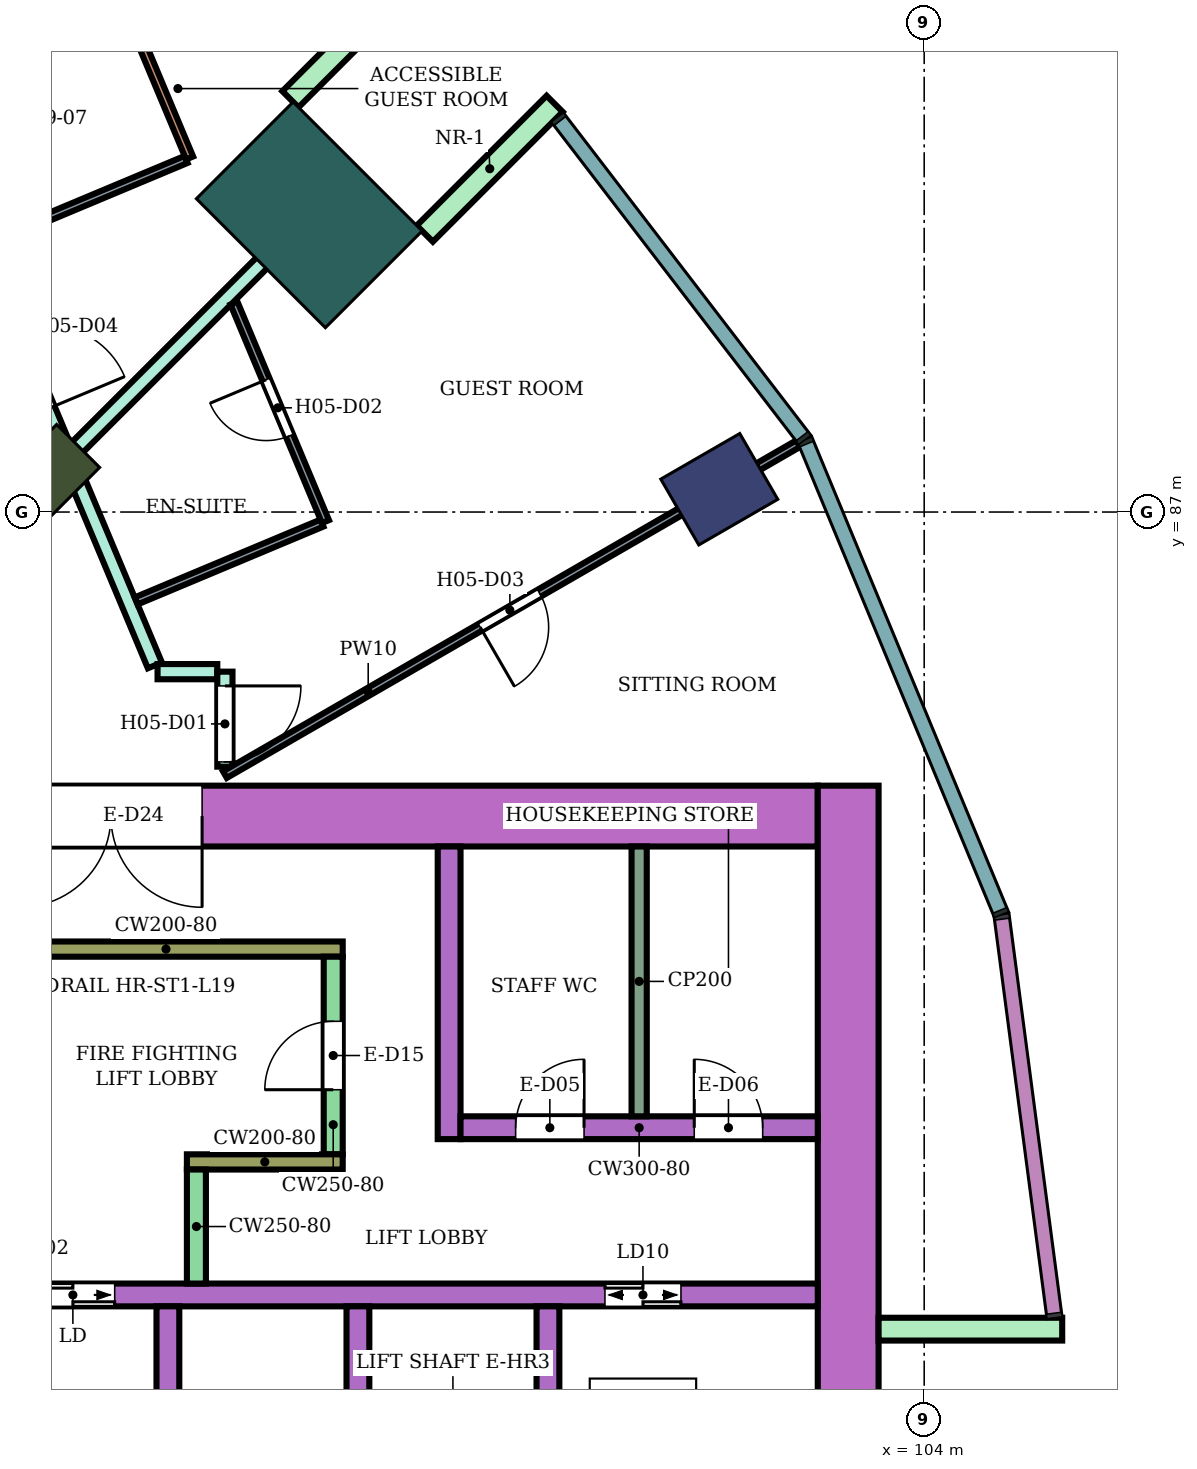
"""IFC4 building model, lengths in metres.
Left out: names, types, materials, properties, quantities, classifications, styles, units other than length and angle.
Written with IfcOpenShell. Run it as: python <this file> out.ifc"""

import sys

from ifc_helpers import new_model, si_unit, direction, frame, frame_2d, origin, origin_2d, place, context, subcontext, project, spatial, rectangle, extrude, element, fill, save


model = new_model("IFC4")
c1 = context("Model", 3, precision=1e-05, world=origin(), true_north=direction((0.0, 1.0)))
c2 = subcontext(c1, "Body", "Model", "MODEL_VIEW")
j1 = project(units=[si_unit("LENGTHUNIT", "METRE"), si_unit("PLANEANGLEUNIT", "RADIAN")], contexts=[c1])
p1 = place(None, origin())
s1 = spatial("IfcSite", under=j1, at=p1, CompositionType="ELEMENT")
p2 = place(p1, origin())
s2 = spatial("IfcBuilding", under=s1, at=p2, CompositionType="ELEMENT")
p3 = place(p2, frame((0.0, 0.0, 86.2)))
s3 = spatial("IfcBuildingStorey", under=s2, at=p3, CompositionType="ELEMENT", Elevation=86.2)
p4 = place(p3, frame((101.304, 87.3, 0.0), z_axis=(0.0, 0.0, 1.0), x_axis=(0.866025403784, 0.5, 0.0)))
e1 = element("IfcColumn", 1, at=p4, inside=s3, PredefinedType="COLUMN", context=c2, shape_type="SweptSolid", body=[
    extrude(rectangle(XDim=1.2, YDim=1.0, at=origin_2d()), origin(), (0.0, 0.0, 1.0), 3.8),
])
p5 = place(p3, frame((92.445, 87.445, 0.0), z_axis=(0.0, 0.0, 1.0), x_axis=(0.707106781187, 0.707106781187, 0.0)))
e2 = element("IfcColumn", 2, at=p5, inside=s3, PredefinedType="COLUMN", context=c2, shape_type="SweptSolid", body=[
    extrude(rectangle(XDim=1.2, YDim=0.8, at=origin_2d()), origin(), (0.0, 0.0, 1.0), 3.8),
])
p6 = place(p3, frame((95.91, 90.91, 0.0), z_axis=(0.0, 0.0, 1.0), x_axis=(0.707106781187, 0.707106781187, 0.0)))
e3 = element("IfcColumn", 3, at=p6, inside=s3, PredefinedType="COLUMN", context=c2, shape_type="SweptSolid", body=[
    extrude(rectangle(XDim=1.8, YDim=2.4, at=origin_2d()), origin(), (0.0, 0.0, 1.0), 3.8),
])
p7 = place(p3, frame((87.9, 83.0, 0.0), z_axis=(0.0, 0.0, 1.0), x_axis=(1.0, 0.0, 0.0)))
e4 = element("IfcWall", 4, at=p7, inside=s3, PredefinedType="SHEAR", context=c2, shape_type="SweptSolid", body=[
    extrude(rectangle(XDim=14.7, YDim=0.8, at=frame_2d((7.35, 0.0))), origin(), (0.0, 0.0, 1.0), 3.48),
])
p8 = place(p7, frame((4.2, 0.0, 0.0)))
e5 = element("IfcOpeningElement", 5, at=p8, cuts=e4, PredefinedType="OPENING", context=c2, shape_type="SweptSolid", body=[
    extrude(rectangle(XDim=2.4, YDim=2.4, at=frame_2d((1.2, 1.2))), frame((0.0, 0.41, 0.0), z_axis=(0.0, -1.0, 0.0), x_axis=(1.0, 0.0, 0.0)), (0.0, 0.0, 1.0), 0.82),
])
p9 = place(p3, frame((103.0, 66.6, 0.0), z_axis=(0.0, 0.0, 1.0), x_axis=(0.0, 1.0, 0.0)))
e6 = element("IfcWall", 6, at=p9, inside=s3, PredefinedType="SHEAR", context=c2, shape_type="SweptSolid", body=[
    extrude(rectangle(XDim=16.8, YDim=0.8, at=frame_2d((8.4, 0.0))), origin(), (0.0, 0.0, 1.0), 3.48),
])
p10 = place(p3, frame((91.7, 76.7, 0.0), z_axis=(0.0, 0.0, 1.0), x_axis=(1.0, 0.0, 0.0)))
e7 = element("IfcWall", 7, at=p10, inside=s3, PredefinedType="SHEAR", context=c2, shape_type="SweptSolid", body=[
    extrude(rectangle(XDim=10.9, YDim=0.3, at=frame_2d((5.45, 0.0))), origin(), (0.0, 0.0, 1.0), 3.48),
])
p11 = place(p10, frame((0.55, 0.0, 0.0)))
e8 = element("IfcOpeningElement", 8, at=p11, cuts=e7, PredefinedType="OPENING", context=c2, shape_type="SweptSolid", body=[
    extrude(rectangle(XDim=1.1, YDim=2.1, at=frame_2d((0.55, 1.05))), frame((0.0, 0.16, 0.0), z_axis=(0.0, -1.0, 0.0), x_axis=(1.0, 0.0, 0.0)), (0.0, 0.0, 1.0), 0.32),
])
p12 = place(p10, frame((8.1, 0.0, 0.0)))
e9 = element("IfcOpeningElement", 9, at=p12, cuts=e7, PredefinedType="OPENING", context=c2, shape_type="SweptSolid", body=[
    extrude(rectangle(XDim=1.0, YDim=2.1, at=frame_2d((0.5, 1.05))), frame((0.0, 0.16, 0.0), z_axis=(0.0, -1.0, 0.0), x_axis=(1.0, 0.0, 0.0)), (0.0, 0.0, 1.0), 0.32),
])
for number, where, z_axis, x_axis in (
    (10, (94.05, 74.0, 0.0), (0.0, 0.0, 1.0), (0.0, 1.0, 0.0)),
    (11, (96.55, 74.0, 0.0), (0.0, 0.0, 1.0), (0.0, 1.0, 0.0)),
    (12, (99.05, 74.0, 0.0), (0.0, 0.0, 1.0), (0.0, 1.0, 0.0)),
):
    element("IfcWall", number, at=place(p3, frame(where, z_axis=z_axis, x_axis=x_axis)), inside=s3, PredefinedType="SHEAR", context=c2, shape_type="SweptSolid", body=[
        extrude(rectangle(XDim=2.55, YDim=0.3, at=frame_2d((1.275, 0.0))), origin(), (0.0, 0.0, 1.0), 3.48),
    ])
p13 = place(p3, frame((91.7, 81.25, 0.0), z_axis=(0.0, 0.0, 1.0), x_axis=(1.0, 0.0, 0.0)))
e13 = element("IfcWall", 13, at=p13, inside=s3, PredefinedType="SHEAR", context=c2, shape_type="SweptSolid", body=[
    extrude(rectangle(XDim=4.65, YDim=0.2, at=frame_2d((2.325, 0.0))), origin(), (0.0, 0.0, 1.0), 3.48),
])
p14 = place(p3, frame((96.225, 78.55, 0.0), z_axis=(0.0, 0.0, 1.0), x_axis=(0.0, 1.0, 0.0)))
e14 = element("IfcWall", 14, at=p14, inside=s3, PredefinedType="SHEAR", context=c2, shape_type="SweptSolid", body=[
    extrude(rectangle(XDim=2.6, YDim=0.25, at=frame_2d((1.3, 0.0))), origin(), (0.0, 0.0, 1.0), 3.48),
])
p15 = place(p14, frame((0.85, 0.0, 0.0)))
e15 = element("IfcOpeningElement", 15, at=p15, cuts=e14, PredefinedType="OPENING", context=c2, shape_type="SweptSolid", body=[
    extrude(rectangle(XDim=0.9, YDim=2.1, at=frame_2d((0.45, 1.05))), frame((0.0, 0.135, 0.0), z_axis=(0.0, -1.0, 0.0), x_axis=(1.0, 0.0, 0.0)), (0.0, 0.0, 1.0), 0.27),
])
p16 = place(p3, frame((94.3, 78.45, 0.0), z_axis=(0.0, 0.0, 1.0), x_axis=(1.0, 0.0, 0.0)))
e16 = element("IfcWall", 16, at=p16, inside=s3, PredefinedType="SHEAR", context=c2, shape_type="SweptSolid", body=[
    extrude(rectangle(XDim=2.05, YDim=0.2, at=frame_2d((1.025, 0.0))), origin(), (0.0, 0.0, 1.0), 3.48),
])
p17 = place(p3, frame((94.425, 76.85, 0.0), z_axis=(0.0, 0.0, 1.0), x_axis=(0.0, 1.0, 0.0)))
e17 = element("IfcWall", 17, at=p17, inside=s3, PredefinedType="SHEAR", context=c2, shape_type="SweptSolid", body=[
    extrude(rectangle(XDim=1.5, YDim=0.25, at=frame_2d((0.75, 0.0))), origin(), (0.0, 0.0, 1.0), 3.48),
])
p18 = place(p3, frame((97.75, 78.75, 0.0), z_axis=(0.0, 0.0, 1.0), x_axis=(0.0, 1.0, 0.0)))
e18 = element("IfcWall", 18, at=p18, inside=s3, PredefinedType="SHEAR", context=c2, shape_type="SweptSolid", body=[
    extrude(rectangle(XDim=3.85, YDim=0.3, at=frame_2d((1.925, 0.0))), origin(), (0.0, 0.0, 1.0), 3.48),
])
p19 = place(p3, frame((97.9, 78.9, 0.0), z_axis=(0.0, 0.0, 1.0), x_axis=(1.0, 0.0, 0.0)))
e19 = element("IfcWall", 19, at=p19, inside=s3, PredefinedType="SHEAR", context=c2, shape_type="SweptSolid", body=[
    extrude(rectangle(XDim=4.7, YDim=0.3, at=frame_2d((2.35, 0.0))), origin(), (0.0, 0.0, 1.0), 3.48),
])
p20 = place(p19, frame((0.725, 0.0, 0.0)))
e20 = element("IfcOpeningElement", 20, at=p20, cuts=e19, PredefinedType="OPENING", context=c2, shape_type="SweptSolid", body=[
    extrude(rectangle(XDim=0.9, YDim=2.1, at=frame_2d((0.45, 1.05))), frame((0.0, 0.16, 0.0), z_axis=(0.0, -1.0, 0.0), x_axis=(1.0, 0.0, 0.0)), (0.0, 0.0, 1.0), 0.32),
])
p21 = place(p19, frame((3.075, 0.0, 0.0)))
e21 = element("IfcOpeningElement", 21, at=p21, cuts=e19, PredefinedType="OPENING", context=c2, shape_type="SweptSolid", body=[
    extrude(rectangle(XDim=0.9, YDim=2.1, at=frame_2d((0.45, 1.05))), frame((0.0, 0.16, 0.0), z_axis=(0.0, -1.0, 0.0), x_axis=(1.0, 0.0, 0.0)), (0.0, 0.0, 1.0), 0.32),
])
for number, where, z_axis, x_axis in (
    (22, (103.4, 76.25, 0.0), (0.0, 0.0, 1.0), (1.0, 0.0, 0.0)),
    (23, (97.43, 90.662, 0.0), (0.0, 0.0, 1.0), (0.707, 0.707, 0.0)),
    (24, (95.662, 92.43, 0.0), (0.0, 0.0, 1.0), (0.707, 0.707, 0.0)),
):
    element("IfcWall", number, at=place(p3, frame(where, z_axis=z_axis, x_axis=x_axis)), inside=s3, PredefinedType="NOTDEFINED", context=c2, shape_type="SweptSolid", body=[
        extrude(rectangle(XDim=2.416, YDim=0.3, at=frame_2d((1.208, 0.0))), origin(), (0.0, 0.0, 1.0), 3.8),
    ])
p22 = place(p3, frame((90.327, 92.878, 0.0), z_axis=(0.0, 0.0, 1.0), x_axis=(0.50022153717, 0.865897461453, 0.0)))
e25 = element("IfcWall", 25, at=p22, inside=s3, PredefinedType="PARTITIONING", context=c2, shape_type="SweptSolid", body=[
    extrude(rectangle(XDim=5.152, YDim=0.2, at=frame_2d((2.576, 0.0))), origin(), (0.0, 0.0, 1.0), 3.35),
])
p23 = place(p3, frame((90.604, 92.805, 0.0), z_axis=(0.0, 0.0, 1.0), x_axis=(0.386209298583, -0.922411176042, 0.0)))
e26 = element("IfcWall", 26, at=p23, inside=s3, PredefinedType="PARTITIONING", context=c2, shape_type="SweptSolid", body=[
    extrude(rectangle(XDim=8.48, YDim=0.2, at=frame_2d((4.24, 0.0))), origin(), (0.0, 0.0, 1.0), 3.35),
])
p24 = place(p23, frame((3.723, 0.0, 0.0)))
e27 = element("IfcOpeningElement", 27, at=p24, cuts=e26, PredefinedType="OPENING", context=c2, shape_type="SweptSolid", body=[
    extrude(rectangle(XDim=1.1, YDim=2.1, at=frame_2d((0.55, 1.05))), frame((0.0, 0.11, 0.0), z_axis=(0.0, -1.0, 0.0), x_axis=(1.0, 0.0, 0.0)), (0.0, 0.0, 1.0), 0.22),
])
p25 = place(p3, frame((92.832, 87.824, 0.0), z_axis=(0.0, 0.0, 1.0), x_axis=(0.707251566381, 0.70696196634, 0.0)))
e28 = element("IfcWall", 28, at=p25, inside=s3, PredefinedType="PARTITIONING", context=c2, shape_type="SweptSolid", body=[
    extrude(rectangle(XDim=5.058, YDim=0.2, at=frame_2d((2.529, 0.0))), origin(), (0.0, 0.0, 1.0), 3.35),
])
p26 = place(p3, frame((93.914, 84.9, 0.0), z_axis=(0.0, 0.0, 1.0), x_axis=(1.0, 0.0, 0.0)))
e29 = element("IfcWall", 29, at=p26, inside=s3, PredefinedType="PARTITIONING", context=c2, shape_type="SweptSolid", body=[
    extrude(rectangle(XDim=0.786, YDim=0.2, at=frame_2d((0.393, 0.0))), origin(), (0.0, 0.0, 1.0), 3.35),
])
p27 = place(p3, frame((94.8, 83.65, 0.0), z_axis=(0.0, 0.0, 1.0), x_axis=(0.0, 1.0, 0.0)))
e30 = element("IfcWall", 30, at=p27, inside=s3, PredefinedType="PARTITIONING", context=c2, shape_type="SweptSolid", body=[
    extrude(rectangle(XDim=1.25, YDim=0.2, at=frame_2d((0.625, 0.0))), origin(), (0.0, 0.0, 1.0), 3.35),
])
p28 = place(p27, frame((0.062, 0.0, 0.0)))
e31 = element("IfcOpeningElement", 31, at=p28, cuts=e30, PredefinedType="OPENING", context=c2, shape_type="SweptSolid", body=[
    extrude(rectangle(XDim=1.0, YDim=2.1, at=frame_2d((0.5, 1.05))), frame((0.0, 0.11, 0.0), z_axis=(0.0, -1.0, 0.0), x_axis=(1.0, 0.0, 0.0)), (0.0, 0.0, 1.0), 0.22),
])
p29 = place(p3, frame((91.661, 90.538, 0.0), z_axis=(0.0, 0.0, 1.0), x_axis=(0.922352973625, 0.386348278169, 0.0)))
e32 = element("IfcWall", 32, at=p29, inside=s3, PredefinedType="PARTITIONING", context=c2, shape_type="SweptSolid", body=[
    extrude(rectangle(XDim=2.85, YDim=0.1, at=frame_2d((1.425, 0.0))), origin(), (0.0, 0.0, 1.0), 3.35),
])
p30 = place(p3, frame((92.414, 96.246, 0.0), z_axis=(0.0, 0.0, 1.0), x_axis=(0.386353683992, -0.922350709256, 0.0)))
e33 = element("IfcWall", 33, at=p30, inside=s3, PredefinedType="PARTITIONING", context=c2, shape_type="SweptSolid", body=[
    extrude(rectangle(XDim=4.974, YDim=0.1, at=frame_2d((2.487, 0.0))), origin(), (0.0, 0.0, 1.0), 2.58),
])
p31 = place(p30, frame((1.957, 0.0, 0.0)))
e34 = element("IfcOpeningElement", 34, at=p31, cuts=e33, PredefinedType="OPENING", context=c2, shape_type="SweptSolid", body=[
    extrude(rectangle(XDim=0.9, YDim=2.1, at=frame_2d((0.45, 1.05))), frame((0.0, 0.06, 0.0), z_axis=(0.0, -1.0, 0.0), x_axis=(1.0, 0.0, 0.0)), (0.0, 0.0, 1.0), 0.12),
])
p32 = place(p3, frame((93.633, 85.831, 0.0), z_axis=(0.0, 0.0, 1.0), x_axis=(0.922344808264, 0.38636777126, 0.0)))
e35 = element("IfcWall", 35, at=p32, inside=s3, PredefinedType="PARTITIONING", context=c2, shape_type="SweptSolid", body=[
    extrude(rectangle(XDim=2.65, YDim=0.1, at=frame_2d((1.325, 0.0))), origin(), (0.0, 0.0, 1.0), 3.35),
])
p33 = place(p3, frame((94.8, 83.545, 0.0), z_axis=(0.0, 0.0, 1.0), x_axis=(0.86602264145, 0.500004784474, 0.0)))
e36 = element("IfcWall", 36, at=p33, inside=s3, PredefinedType="PARTITIONING", context=c2, shape_type="SweptSolid", body=[
    extrude(rectangle(XDim=8.708, YDim=0.1, at=frame_2d((4.354, 0.0))), origin(), (0.0, 0.0, 1.0), 3.35),
])
p34 = place(p33, frame((3.879, 0.0, 0.0)))
e37 = element("IfcOpeningElement", 37, at=p34, cuts=e36, PredefinedType="OPENING", context=c2, shape_type="SweptSolid", body=[
    extrude(rectangle(XDim=0.9, YDim=2.1, at=frame_2d((0.45, 1.05))), frame((0.0, 0.06, 0.0), z_axis=(0.0, -1.0, 0.0), x_axis=(1.0, 0.0, 0.0)), (0.0, 0.0, 1.0), 0.12),
])
p35 = place(p3, frame((94.919, 89.748, 0.0), z_axis=(0.0, 0.0, 1.0), x_axis=(0.38635048828, -0.922352047868, 0.0)))
e38 = element("IfcWall", 38, at=p35, inside=s3, PredefinedType="PARTITIONING", context=c2, shape_type="SweptSolid", body=[
    extrude(rectangle(XDim=3.116, YDim=0.1, at=frame_2d((1.558, 0.0))), origin(), (0.0, 0.0, 1.0), 3.35),
])
p36 = place(p35, frame((1.093, 0.0, 0.0)))
e39 = element("IfcOpeningElement", 39, at=p36, cuts=e38, PredefinedType="OPENING", context=c2, shape_type="SweptSolid", body=[
    extrude(rectangle(XDim=0.8, YDim=2.1, at=frame_2d((0.4, 1.05))), frame((0.0, 0.06, 0.0), z_axis=(0.0, -1.0, 0.0), x_axis=(1.0, 0.0, 0.0)), (0.0, 0.0, 1.0), 0.12),
])
p37 = place(p3, frame((100.25, 79.05, 0.0), z_axis=(0.0, 0.0, 1.0), x_axis=(0.0, 1.0, 0.0)))
e40 = element("IfcWall", 40, at=p37, inside=s3, PredefinedType="PARTITIONING", context=c2, shape_type="SweptSolid", body=[
    extrude(rectangle(XDim=3.55, YDim=0.2, at=frame_2d((1.775, 0.0))), origin(), (0.0, 0.0, 1.0), 3.48),
])
p38 = place(p28, frame((1.0, 0.0, 0.0), z_axis=(0.0, 0.0, 1.0), x_axis=(-1.0, 0.0, 0.0)))
e41 = element("IfcDoor", 41, at=p38, inside=s3, OperationType="SINGLE_SWING_LEFT", PredefinedType="DOOR", context=c2, shape_type="SweptSolid", body=[
    extrude(rectangle(XDim=1.0, YDim=2.1, at=frame_2d((0.5, 1.05))), frame((0.0, 0.025, 0.0), z_axis=(0.0, -1.0, 0.0), x_axis=(1.0, 0.0, 0.0)), (0.0, 0.0, 1.0), 0.05),
])
fill(e31, e41)
p39 = place(p36, frame((0.8, 0.0, 0.0), z_axis=(0.0, 0.0, 1.0), x_axis=(-1.0, 0.0, 0.0)))
e42 = element("IfcDoor", 42, at=p39, inside=s3, OperationType="SINGLE_SWING_RIGHT", PredefinedType="DOOR", context=c2, shape_type="SweptSolid", body=[
    extrude(rectangle(XDim=0.8, YDim=2.1, at=frame_2d((0.4, 1.05))), frame((0.0, 0.025, 0.0), z_axis=(0.0, -1.0, 0.0), x_axis=(1.0, 0.0, 0.0)), (0.0, 0.0, 1.0), 0.05),
])
fill(e39, e42)
p40 = place(p34, frame((0.9, 0.0, 0.0), z_axis=(0.0, 0.0, 1.0), x_axis=(-1.0, 0.0, 0.0)))
e43 = element("IfcDoor", 43, at=p40, inside=s3, OperationType="SINGLE_SWING_RIGHT", PredefinedType="DOOR", context=c2, shape_type="SweptSolid", body=[
    extrude(rectangle(XDim=0.9, YDim=2.1, at=frame_2d((0.45, 1.05))), frame((0.0, 0.025, 0.0), z_axis=(0.0, -1.0, 0.0), x_axis=(1.0, 0.0, 0.0)), (0.0, 0.0, 1.0), 0.05),
])
fill(e37, e43)
p41 = place(p11, origin())
e44 = element("IfcDoor", 44, at=p41, inside=s3, OperationType="DOUBLE_DOOR_SLIDING", PredefinedType="DOOR", context=c2, shape_type="SweptSolid", body=[
    extrude(rectangle(XDim=1.1, YDim=2.1, at=frame_2d((0.55, 1.05))), frame((0.0, 0.025, 0.0), z_axis=(0.0, -1.0, 0.0), x_axis=(1.0, 0.0, 0.0)), (0.0, 0.0, 1.0), 0.05),
])
fill(e8, e44)
p42 = place(p12, origin())
e45 = element("IfcDoor", 45, at=p42, inside=s3, OperationType="DOUBLE_DOOR_SLIDING", PredefinedType="DOOR", context=c2, shape_type="SweptSolid", body=[
    extrude(rectangle(XDim=1.0, YDim=2.1, at=frame_2d((0.5, 1.05))), frame((0.0, 0.025, 0.0), z_axis=(0.0, -1.0, 0.0), x_axis=(1.0, 0.0, 0.0)), (0.0, 0.0, 1.0), 0.05),
])
fill(e9, e45)
p43 = place(p15, origin())
e46 = element("IfcDoor", 46, at=p43, inside=s3, OperationType="SINGLE_SWING_LEFT", PredefinedType="DOOR", context=c2, shape_type="SweptSolid", body=[
    extrude(rectangle(XDim=0.9, YDim=2.1, at=frame_2d((0.45, 1.05))), frame((0.0, 0.025, 0.0), z_axis=(0.0, -1.0, 0.0), x_axis=(1.0, 0.0, 0.0)), (0.0, 0.0, 1.0), 0.05),
])
fill(e15, e46)
p44 = place(p20, origin())
e47 = element("IfcDoor", 47, at=p44, inside=s3, OperationType="SINGLE_SWING_RIGHT", PredefinedType="DOOR", context=c2, shape_type="SweptSolid", body=[
    extrude(rectangle(XDim=0.9, YDim=2.1, at=frame_2d((0.45, 1.05))), frame((0.0, 0.025, 0.0), z_axis=(0.0, -1.0, 0.0), x_axis=(1.0, 0.0, 0.0)), (0.0, 0.0, 1.0), 0.05),
])
fill(e20, e47)
p45 = place(p21, origin())
e48 = element("IfcDoor", 48, at=p45, inside=s3, OperationType="SINGLE_SWING_LEFT", PredefinedType="DOOR", context=c2, shape_type="SweptSolid", body=[
    extrude(rectangle(XDim=0.9, YDim=2.1, at=frame_2d((0.45, 1.05))), frame((0.0, 0.025, 0.0), z_axis=(0.0, -1.0, 0.0), x_axis=(1.0, 0.0, 0.0)), (0.0, 0.0, 1.0), 0.05),
])
fill(e21, e48)
p46 = place(p8, frame((2.4, 0.0, 0.0), z_axis=(0.0, 0.0, 1.0), x_axis=(-1.0, 0.0, 0.0)))
e49 = element("IfcDoor", 49, at=p46, inside=s3, OperationType="DOUBLE_DOOR_SINGLE_SWING", PredefinedType="DOOR", context=c2, shape_type="SweptSolid", body=[
    extrude(rectangle(XDim=2.4, YDim=2.4, at=frame_2d((1.2, 1.2))), frame((0.0, 0.025, 0.0), z_axis=(0.0, -1.0, 0.0), x_axis=(1.0, 0.0, 0.0)), (0.0, 0.0, 1.0), 0.05),
])
fill(e5, e49)
save(model, sys.argv[1])
